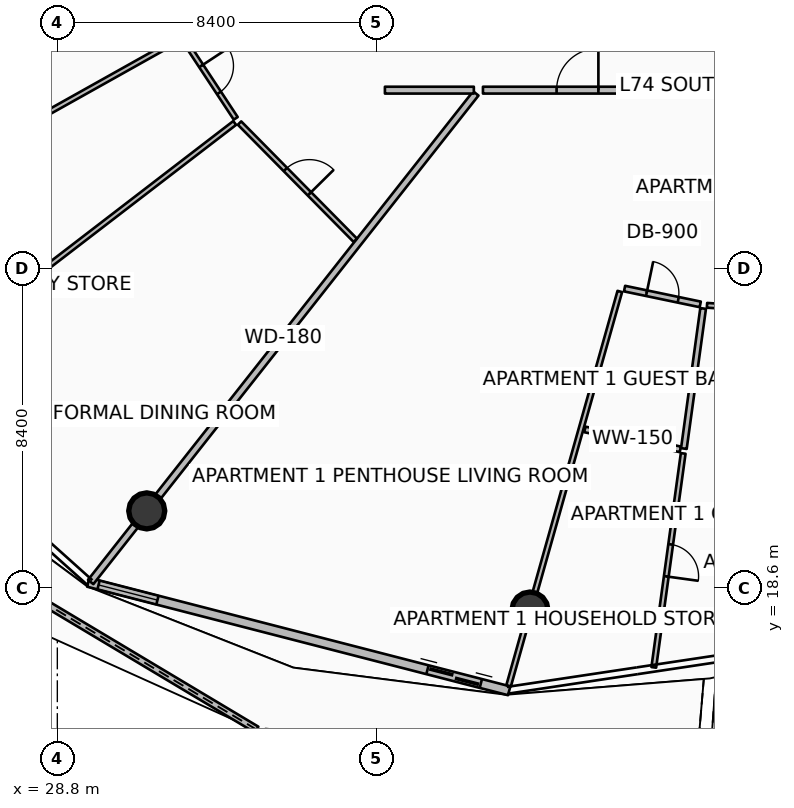
"""IFC4 building model, lengths in metres.
Left out: names, types, materials, properties, quantities, classifications, styles, units other than length and angle.
Written with IfcOpenShell. Run it as: python <this file> out.ifc"""

import sys

from ifc_helpers import new_model, si_unit, direction, frame, frame_2d, origin, origin_2d, place, context, subcontext, project, spatial, polyline, rectangle, circle, outline, extrude, element, fill, save


model = new_model("IFC4")
c1 = context("Model", 3, precision=1e-05, world=origin(), true_north=direction((0.0, 1.0)))
c2 = subcontext(c1, "Body", "Model", "MODEL_VIEW")
j1 = project(units=[si_unit("LENGTHUNIT", "METRE"), si_unit("PLANEANGLEUNIT", "RADIAN")], contexts=[c1])
p1 = place(None, origin())
s1 = spatial("IfcSite", under=j1, at=p1, CompositionType="ELEMENT")
p2 = place(p1, origin())
s2 = spatial("IfcBuilding", under=s1, at=p2, CompositionType="ELEMENT")
p3 = place(p2, frame((0.0, 0.0, 294.45)))
s3 = spatial("IfcBuildingStorey", under=s2, at=p3, CompositionType="ELEMENT", Elevation=294.45)
for number, where, z_axis, x_axis in (
    (1, (31.153, 20.629, 0.0), (0.0, 0.0, 1.0), (1.0, 0.0, 0.0)),
    (2, (41.237, 18.021, 0.0), (0.0, 0.0, 1.0), (1.0, 0.0, 0.0)),
):
    element("IfcColumn", number, at=place(p3, frame(where, z_axis=z_axis, x_axis=x_axis)), inside=s3, PredefinedType="COLUMN", context=c2, shape_type="SweptSolid", body=[
        extrude(circle(Radius=0.475, at=origin_2d()), origin(), (0.0, 0.0, 1.0), 3.59),
    ])
p4 = place(p3, frame((23.749, 21.03, 0.0), z_axis=(0.0, 0.0, 1.0), x_axis=(0.858273121585, -0.513193188541, 0.0)))
e3 = element("IfcWall", 3, at=p4, inside=s3, PredefinedType="PARAPET", context=c2, shape_type="SweptSolid", body=[
    extrude(outline(polyline([(0.0, 0.0), (11.996, 0.0), (11.995, 1.348), (5.998, 1.182), (0.0, 1.12), (0.0, 0.0)])), frame((0.0, 0.09, 0.0), z_axis=(0.0, -1.0, 0.0), x_axis=(1.0, 0.0, 0.0)), (0.0, 0.0, 1.0), 0.18),
])
p5 = place(p3, frame((45.952, 13.781, 0.0), z_axis=(0.0, 0.0, 1.0), x_axis=(0.972325059784, 0.233632142729, 0.0)))
e4 = element("IfcWall", 4, at=p5, inside=s3, PredefinedType="PARAPET", context=c2, shape_type="SweptSolid", body=[
    extrude(outline(polyline([(0.0, 0.0), (10.58, 0.0), (10.58, 1.832), (5.29, 1.853), (0.0, 1.756), (0.0, 0.0)])), frame((0.0, 0.09, 0.0), z_axis=(0.0, -1.0, 0.0), x_axis=(1.0, 0.0, 0.0)), (0.0, 0.0, 1.0), 0.18),
])
p6 = place(p3, frame((29.614, 18.751, 0.0), z_axis=(0.0, 0.0, 1.0), x_axis=(0.968343758421, -0.249620442927, 0.0)))
e5 = element("IfcWall", 5, at=p6, inside=s3, PredefinedType="SOLIDWALL", context=c2, shape_type="SweptSolid", body=[
    extrude(rectangle(XDim=11.438, YDim=0.24, at=frame_2d((5.719, 0.0))), origin(), (0.0, 0.0, 1.0), 2.54),
])
p7 = place(p6, frame((9.218, 0.0, 0.0)))
e6 = element("IfcOpeningElement", 6, at=p7, cuts=e5, PredefinedType="OPENING", context=c2, shape_type="SweptSolid", body=[
    extrude(rectangle(XDim=1.45, YDim=2.15, at=frame_2d((0.725, 1.075))), frame((0.0, 0.13, 0.0), z_axis=(0.0, -1.0, 0.0), x_axis=(1.0, 0.0, 0.0)), (0.0, 0.0, 1.0), 0.26),
])
p8 = place(p6, frame((0.28, 0.0, 0.65)))
e7 = element("IfcOpeningElement", 7, at=p8, cuts=e5, PredefinedType="OPENING", context=c2, shape_type="SweptSolid", body=[
    extrude(rectangle(XDim=1.6, YDim=1.5, at=frame_2d((0.8, 0.75))), frame((0.0, 0.13, 0.0), z_axis=(0.0, -1.0, 0.0), x_axis=(1.0, 0.0, 0.0)), (0.0, 0.0, 1.0), 0.26),
])
p9 = place(p3, frame((39.812, 31.614, 0.0), z_axis=(0.0, 0.0, 1.0), x_axis=(-0.619097230176, -0.785314344443, 0.0)))
e8 = element("IfcWall", 8, at=p9, inside=s3, PredefinedType="PARTITIONING", context=c2, shape_type="SweptSolid", body=[
    extrude(rectangle(XDim=16.37, YDim=0.18, at=frame_2d((8.185, 0.0))), origin(), (0.0, 0.0, 1.0), 2.957),
])
p10 = place(p3, frame((40.0, 31.7, 0.0), z_axis=(0.0, 0.0, 1.0), x_axis=(1.0, 0.0, 0.0)))
e9 = element("IfcWall", 9, at=p10, inside=s3, PredefinedType="PARTITIONING", context=c2, shape_type="SweptSolid", body=[
    extrude(rectangle(XDim=4.975, YDim=0.18, at=frame_2d((2.488, 0.0))), origin(), (0.0, 0.0, 1.0), 2.957),
])
p11 = place(p10, frame((1.938, 0.0, 0.0)))
e10 = element("IfcOpeningElement", 10, at=p11, cuts=e9, PredefinedType="OPENING", context=c2, shape_type="SweptSolid", body=[
    extrude(rectangle(XDim=1.1, YDim=2.1, at=frame_2d((0.55, 1.05))), frame((0.0, 0.1, 0.0), z_axis=(0.0, -1.0, 0.0), x_axis=(1.0, 0.0, 0.0)), (0.0, 0.0, 1.0), 0.2),
])
p12 = place(p3, frame((45.215, 31.7, 0.0), z_axis=(0.0, 0.0, 1.0), x_axis=(1.0, 0.0, 0.0)))
e11 = element("IfcWall", 11, at=p12, inside=s3, PredefinedType="PARTITIONING", context=c2, shape_type="SweptSolid", body=[
    extrude(rectangle(XDim=3.884, YDim=0.18, at=frame_2d((1.942, 0.0))), origin(), (0.0, 0.0, 1.0), 2.957),
])
p13 = place(p3, frame((43.601, 26.403, 0.0), z_axis=(0.0, 0.0, 1.0), x_axis=(-0.271440797747, -0.962455138341, 0.0)))
e12 = element("IfcWall", 12, at=p13, inside=s3, PredefinedType="PARTITIONING", context=c2, shape_type="SweptSolid", body=[
    extrude(rectangle(XDim=10.779, YDim=0.125, at=frame_2d((5.389, 0.0))), origin(), (0.0, 0.0, 1.0), 2.957),
])
p14 = place(p3, frame((43.726, 26.478, 0.0), z_axis=(0.0, 0.0, 1.0), x_axis=(0.978898482471, -0.204347158084, 0.0)))
e13 = element("IfcWall", 13, at=p14, inside=s3, PredefinedType="PARTITIONING", context=c2, shape_type="SweptSolid", body=[
    extrude(rectangle(XDim=2.035, YDim=0.15, at=frame_2d((1.017, 0.0))), origin(), (0.0, 0.0, 1.0), 2.957),
])
p15 = place(p14, frame((0.592, 0.0, 0.0)))
e14 = element("IfcOpeningElement", 14, at=p15, cuts=e13, PredefinedType="OPENING", context=c2, shape_type="SweptSolid", body=[
    extrude(rectangle(XDim=0.85, YDim=2.06, at=frame_2d((0.425, 1.03))), frame((0.0, 0.085, 0.0), z_axis=(0.0, -1.0, 0.0), x_axis=(1.0, 0.0, 0.0)), (0.0, 0.0, 1.0), 0.17),
])
p16 = place(p3, frame((42.681, 22.773, 0.0), z_axis=(0.0, 0.0, 1.0), x_axis=(0.978918641327, -0.204250565882, 0.0)))
e15 = element("IfcWall", 15, at=p16, inside=s3, PredefinedType="PARTITIONING", context=c2, shape_type="SweptSolid", body=[
    extrude(rectangle(XDim=2.566, YDim=0.15, at=frame_2d((1.283, 0.0))), origin(), (0.0, 0.0, 1.0), 2.957),
])
p17 = place(p3, frame((45.793, 25.955, 0.0), z_axis=(0.0, 0.0, 1.0), x_axis=(-0.136246520483, -0.990674964686, 0.0)))
e16 = element("IfcWall", 16, at=p17, inside=s3, PredefinedType="PARTITIONING", context=c2, shape_type="SweptSolid", body=[
    extrude(rectangle(XDim=3.72, YDim=0.15, at=frame_2d((1.86, 0.0))), origin(), (0.0, 0.0, 1.0), 3.03),
])
p18 = place(p3, frame((45.269, 22.141, 0.0), z_axis=(0.0, 0.0, 1.0), x_axis=(-0.136209906248, -0.990679999515, 0.0)))
e17 = element("IfcWall", 17, at=p18, inside=s3, PredefinedType="PARTITIONING", context=c2, shape_type="SweptSolid", body=[
    extrude(rectangle(XDim=5.682, YDim=0.125, at=frame_2d((2.841, 0.0))), origin(), (0.0, 0.0, 1.0), 3.03),
])
p19 = place(p18, frame((2.416, 0.0, 0.0)))
e18 = element("IfcOpeningElement", 18, at=p19, cuts=e17, PredefinedType="OPENING", context=c2, shape_type="SweptSolid", body=[
    extrude(rectangle(XDim=0.85, YDim=2.06, at=frame_2d((0.425, 1.03))), frame((0.0, 0.073, 0.0), z_axis=(0.0, -1.0, 0.0), x_axis=(1.0, 0.0, 0.0)), (0.0, 0.0, 1.0), 0.145),
])
p20 = place(p3, frame((45.896, 26.038, 0.0), z_axis=(0.0, 0.0, 1.0), x_axis=(0.997945365671, -0.064070641766, 0.0)))
e19 = element("IfcWall", 19, at=p20, inside=s3, PredefinedType="PARTITIONING", context=c2, shape_type="SweptSolid", body=[
    extrude(rectangle(XDim=2.164, YDim=0.125, at=frame_2d((1.082, 0.0))), origin(), (0.0, 0.0, 1.0), 3.03),
])
p21 = place(p20, frame((0.657, 0.0, 0.0)))
e20 = element("IfcOpeningElement", 20, at=p21, cuts=e19, PredefinedType="OPENING", context=c2, shape_type="SweptSolid", body=[
    extrude(rectangle(XDim=0.85, YDim=2.06, at=frame_2d((0.425, 1.03))), frame((0.0, 0.073, 0.0), z_axis=(0.0, -1.0, 0.0), x_axis=(1.0, 0.0, 0.0)), (0.0, 0.0, 1.0), 0.145),
])
p22 = place(p3, frame((30.961, 35.254, 0.0), z_axis=(0.0, 0.0, 1.0), x_axis=(-0.929771128666, -0.368138083195, 0.0)))
e21 = element("IfcWall", 21, at=p22, inside=s3, PredefinedType="PARTITIONING", context=c2, shape_type="SweptSolid", body=[
    extrude(rectangle(XDim=11.578, YDim=0.125, at=frame_2d((5.789, 0.0))), origin(), (0.0, 0.0, 1.0), 3.03),
])
p23 = place(p3, frame((37.42, 31.7, 0.0), z_axis=(0.0, 0.0, 1.0), x_axis=(1.0, 0.0, 0.0)))
e22 = element("IfcWall", 22, at=p23, inside=s3, PredefinedType="PARTITIONING", context=c2, shape_type="SweptSolid", body=[
    extrude(rectangle(XDim=2.34, YDim=0.18, at=frame_2d((1.17, 0.0))), origin(), (0.0, 0.0, 1.0), 2.957),
])
p24 = place(p3, frame((32.002, 33.041, 0.0), z_axis=(0.0, 0.0, 1.0), x_axis=(-0.872499131003, -0.488615663276, 0.0)))
e23 = element("IfcWall", 23, at=p24, inside=s3, PredefinedType="PARTITIONING", context=c2, shape_type="SweptSolid", body=[
    extrude(rectangle(XDim=12.094, YDim=0.125, at=frame_2d((6.047, 0.0))), origin(), (0.0, 0.0, 1.0), 2.957),
])
p25 = place(p3, frame((33.467, 30.836, 0.0), z_axis=(0.0, 0.0, 1.0), x_axis=(-0.793032685216, -0.609179087115, 0.0)))
e24 = element("IfcWall", 24, at=p25, inside=s3, PredefinedType="PARTITIONING", context=c2, shape_type="SweptSolid", body=[
    extrude(rectangle(XDim=11.72, YDim=0.125, at=frame_2d((5.86, 0.0))), origin(), (0.0, 0.0, 1.0), 3.03),
])
p26 = place(p3, frame((32.144, 33.006, 0.0), z_axis=(0.0, 0.0, 1.0), x_axis=(0.550305477067, -0.83496340154, 0.0)))
e25 = element("IfcWall", 25, at=p26, inside=s3, PredefinedType="PARTITIONING", context=c2, shape_type="SweptSolid", body=[
    extrude(rectangle(XDim=2.453, YDim=0.125, at=frame_2d((1.227, 0.0))), origin(), (0.0, 0.0, 1.0), 2.957),
])
p27 = place(p26, frame((0.802, 0.0, 0.0)))
e26 = element("IfcOpeningElement", 26, at=p27, cuts=e25, PredefinedType="OPENING", context=c2, shape_type="SweptSolid", body=[
    extrude(rectangle(XDim=0.85, YDim=2.06, at=frame_2d((0.425, 1.03))), frame((0.0, 0.073, 0.0), z_axis=(0.0, -1.0, 0.0), x_axis=(1.0, 0.0, 0.0)), (0.0, 0.0, 1.0), 0.145),
])
p28 = place(p3, frame((33.594, 30.834, 0.0), z_axis=(0.0, 0.0, 1.0), x_axis=(0.702642820289, -0.711542737365, 0.0)))
e27 = element("IfcWall", 27, at=p28, inside=s3, PredefinedType="PARTITIONING", context=c2, shape_type="SweptSolid", body=[
    extrude(rectangle(XDim=4.334, YDim=0.125, at=frame_2d((2.167, 0.0))), origin(), (0.0, 0.0, 1.0), 2.957),
])
p29 = place(p28, frame((1.717, 0.0, 0.0)))
e28 = element("IfcOpeningElement", 28, at=p29, cuts=e27, PredefinedType="OPENING", context=c2, shape_type="SweptSolid", body=[
    extrude(rectangle(XDim=0.9, YDim=2.08, at=frame_2d((0.45, 1.04))), frame((0.0, 0.073, 0.0), z_axis=(0.0, -1.0, 0.0), x_axis=(1.0, 0.0, 0.0)), (0.0, 0.0, 1.0), 0.145),
])
p30 = place(p7, origin())
e29 = element("IfcDoor", 29, at=p30, inside=s3, OperationType="DOUBLE_DOOR_SLIDING", PredefinedType="DOOR", context=c2, shape_type="SweptSolid", body=[
    extrude(rectangle(XDim=1.45, YDim=2.15, at=frame_2d((0.725, 1.075))), frame((0.0, 0.025, 0.0), z_axis=(0.0, -1.0, 0.0), x_axis=(1.0, 0.0, 0.0)), (0.0, 0.0, 1.0), 0.05),
])
fill(e6, e29)
p31 = place(p8, origin())
e30 = element("IfcWindow", 30, at=p31, inside=s3, PartitioningType="SINGLE_PANEL", PredefinedType="WINDOW", context=c2, shape_type="SweptSolid", body=[
    extrude(rectangle(XDim=1.6, YDim=1.5, at=frame_2d((0.8, 0.75))), frame((0.0, 0.03, 0.0), z_axis=(0.0, -1.0, 0.0), x_axis=(1.0, 0.0, 0.0)), (0.0, 0.0, 1.0), 0.06),
])
fill(e7, e30)
p32 = place(p11, origin())
e31 = element("IfcDoor", 31, at=p32, inside=s3, OperationType="SINGLE_SWING_RIGHT", PredefinedType="DOOR", context=c2, shape_type="SweptSolid", body=[
    extrude(rectangle(XDim=1.1, YDim=2.1, at=frame_2d((0.55, 1.05))), frame((0.0, 0.025, 0.0), z_axis=(0.0, -1.0, 0.0), x_axis=(1.0, 0.0, 0.0)), (0.0, 0.0, 1.0), 0.05),
])
fill(e10, e31)
p33 = place(p15, origin())
e32 = element("IfcDoor", 32, at=p33, inside=s3, OperationType="SINGLE_SWING_LEFT", PredefinedType="DOOR", context=c2, shape_type="SweptSolid", body=[
    extrude(rectangle(XDim=0.85, YDim=2.06, at=frame_2d((0.425, 1.03))), frame((0.0, 0.025, 0.0), z_axis=(0.0, -1.0, 0.0), x_axis=(1.0, 0.0, 0.0)), (0.0, 0.0, 1.0), 0.05),
])
fill(e14, e32)
p34 = place(p19, origin())
e33 = element("IfcDoor", 33, at=p34, inside=s3, OperationType="SINGLE_SWING_RIGHT", PredefinedType="DOOR", context=c2, shape_type="SweptSolid", body=[
    extrude(rectangle(XDim=0.85, YDim=2.06, at=frame_2d((0.425, 1.03))), frame((0.0, 0.025, 0.0), z_axis=(0.0, -1.0, 0.0), x_axis=(1.0, 0.0, 0.0)), (0.0, 0.0, 1.0), 0.05),
])
fill(e18, e33)
p35 = place(p27, origin())
e34 = element("IfcDoor", 34, at=p35, inside=s3, OperationType="SINGLE_SWING_LEFT", PredefinedType="DOOR", context=c2, shape_type="SweptSolid", body=[
    extrude(rectangle(XDim=0.85, YDim=2.06, at=frame_2d((0.425, 1.03))), frame((0.0, 0.025, 0.0), z_axis=(0.0, -1.0, 0.0), x_axis=(1.0, 0.0, 0.0)), (0.0, 0.0, 1.0), 0.05),
])
fill(e26, e34)
p36 = place(p29, origin())
e35 = element("IfcDoor", 35, at=p36, inside=s3, OperationType="SINGLE_SWING_RIGHT", PredefinedType="DOOR", context=c2, shape_type="SweptSolid", body=[
    extrude(rectangle(XDim=0.9, YDim=2.08, at=frame_2d((0.45, 1.04))), frame((0.0, 0.025, 0.0), z_axis=(0.0, -1.0, 0.0), x_axis=(1.0, 0.0, 0.0)), (0.0, 0.0, 1.0), 0.05),
])
fill(e28, e35)
save(model, sys.argv[1])
